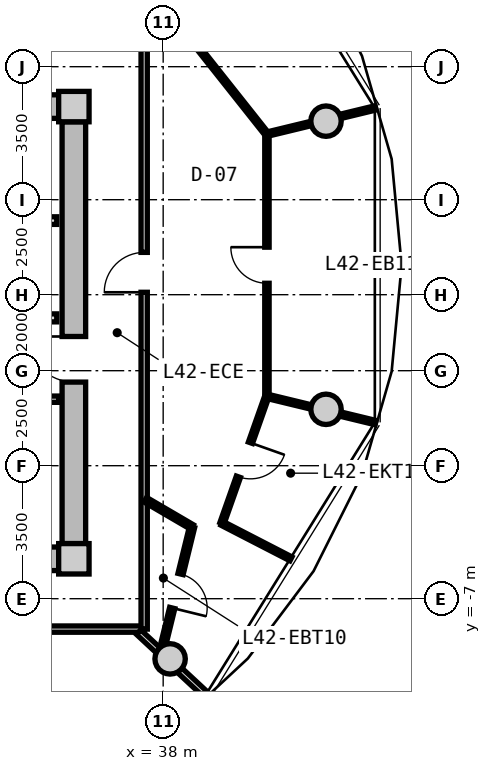
"""IFC4 building model, lengths in metres.
Left out: names, types, materials, properties, quantities, classifications, styles, units other than length and angle.
Written with IfcOpenShell. Run it as: python <this file> out.ifc"""

import sys

from ifc_helpers import new_model, si_unit, direction, frame, frame_2d, origin, origin_2d, place, context, subcontext, project, spatial, rectangle, circle, extrude, source, transform, mapped, element, fill, save


model = new_model("IFC4")
c1 = context("Model", 3, precision=1e-05, world=origin(), true_north=direction((0.0, 1.0)))
c2 = subcontext(c1, "Body", "Model", "MODEL_VIEW")
j1 = project(units=[si_unit("LENGTHUNIT", "METRE"), si_unit("PLANEANGLEUNIT", "RADIAN")], contexts=[c1])
p1 = place(None, origin())
s1 = spatial("IfcSite", under=j1, at=p1, CompositionType="ELEMENT")
p2 = place(p1, origin())
s2 = spatial("IfcBuilding", under=s1, at=p2, CompositionType="ELEMENT")
p3 = place(p2, frame((0.0, 0.0, 137.35)))
s3 = spatial("IfcBuildingStorey", under=s2, at=p3, CompositionType="ELEMENT", Elevation=137.35)
m1 = source(origin(), c2, "Body", "SweptSolid", [
    extrude(rectangle(XDim=0.8, YDim=0.8, at=origin_2d()), origin(), (0.0, 0.0, 1.0), 3.05),
])
for number, where, z_axis, x_axis in (
    (1, (35.65, -5.95, 0.0), (0.0, 0.0, 1.0), (1.0, 0.0, 0.0)),
    (2, (35.65, 5.95, 0.0), (0.0, 0.0, 1.0), (1.0, 0.0, 0.0)),
):
    element("IfcColumn", number, at=place(p3, frame(where, z_axis=z_axis, x_axis=x_axis)), inside=s3, PredefinedType="COLUMN", context=c2, shape_type="MappedRepresentation", body=[
        mapped(m1, transform((0.0, 0.0, 0.0), x_axis=(1.0, 0.0, 0.0), y_axis=(0.0, 1.0, 0.0), z_axis=(0.0, 0.0, 1.0), scale=1.0)),
    ])
m2 = source(origin(), c2, "Body", "SweptSolid", [
    extrude(rectangle(XDim=14.5, YDim=0.62, at=frame_2d((7.25, 0.0))), origin(), (0.0, 0.0, 1.0), 2.81),
])
for number, where, z_axis, x_axis in (
    (3, (20.75, 5.95, 0.0), (0.0, 0.0, 1.0), (1.0, 0.0, 0.0)),
    (4, (35.25, -5.95, 0.0), (0.0, 0.0, 1.0), (-1.0, 0.0, 0.0)),
):
    element("IfcWall", number, at=place(p3, frame(where, z_axis=z_axis, x_axis=x_axis)), inside=s3, PredefinedType="SHEAR", context=c2, shape_type="MappedRepresentation", body=[
        mapped(m2, transform((0.0, 0.0, 0.0), x_axis=(1.0, 0.0, 0.0), y_axis=(0.0, 1.0, 0.0), z_axis=(0.0, 0.0, 1.0), scale=1.0)),
    ])
m3 = source(origin(), c2, "Body", "SweptSolid", [
    extrude(rectangle(XDim=11.1, YDim=0.62, at=frame_2d((5.55, 0.0))), origin(), (0.0, 0.0, 1.0), 2.81),
])
p4 = place(p3, frame((35.65, 5.55, 0.0), z_axis=(0.0, 0.0, 1.0), x_axis=(0.0, -1.0, 0.0)))
e5 = element("IfcWall", 5, at=p4, inside=s3, PredefinedType="SHEAR", context=c2, shape_type="MappedRepresentation", body=[
    mapped(m3, transform((0.0, 0.0, 0.0), x_axis=(1.0, 0.0, 0.0), y_axis=(0.0, 1.0, 0.0), z_axis=(0.0, 0.0, 1.0), scale=1.0)),
])
p5 = place(p4, frame((5.65, 0.0, 0.0)))
e6 = element("IfcOpeningElement", 6, at=p5, cuts=e5, PredefinedType="OPENING", context=c2, shape_type="SweptSolid", body=[
    extrude(rectangle(XDim=1.2, YDim=2.15, at=frame_2d((0.6, 1.075))), frame((0.0, 0.32, 0.0), z_axis=(0.0, -1.0, 0.0), x_axis=(1.0, 0.0, 0.0)), (0.0, 0.0, 1.0), 0.64),
])
m4 = source(origin(), c2, "Body", "SweptSolid", [
    extrude(circle(Radius=0.4, at=origin_2d()), origin(), (0.0, 0.0, 1.0), 3.05),
])
for number, where, z_axis, x_axis in (
    (7, (42.285, 5.567, 0.0), (0.0, 0.0, 1.0), (1.0, 0.0, 0.0)),
    (8, (38.183, -8.584, 0.0), (0.0, 0.0, 1.0), (1.0, 0.0, 0.0)),
    (9, (42.285, -2.016, 0.0), (0.0, 0.0, 1.0), (1.0, 0.0, 0.0)),
):
    element("IfcColumn", number, at=place(p3, frame(where, z_axis=z_axis, x_axis=x_axis)), inside=s3, PredefinedType="COLUMN", context=c2, shape_type="MappedRepresentation", body=[
        mapped(m4, transform((0.0, 0.0, 0.0), x_axis=(1.0, 0.0, 0.0), y_axis=(0.0, 1.0, 0.0), z_axis=(0.0, 0.0, 1.0), scale=1.0)),
    ])
m5 = source(origin(), c2, "Body", "SweptSolid", [
    extrude(rectangle(XDim=3.2, YDim=0.2, at=frame_2d((1.6, 0.0))), origin(), (0.0, 0.0, 1.0), 2.795),
])
p6 = place(p3, frame((32.0, 2.95, 0.0), z_axis=(0.0, 0.0, 1.0), x_axis=(1.0, 0.0, 0.0)))
e10 = element("IfcWall", 10, at=p6, inside=s3, PredefinedType="PARTITIONING", context=c2, shape_type="MappedRepresentation", body=[
    mapped(m5, transform((0.0, 0.0, 0.0), x_axis=(1.0, 0.0, 0.0), y_axis=(0.0, 1.0, 0.0), z_axis=(0.0, 0.0, 1.0), scale=1.0)),
])
m6 = source(origin(), c2, "Body", "SweptSolid", [
    extrude(rectangle(XDim=6.66, YDim=0.21, at=frame_2d((3.33, 0.0))), origin(), (0.0, 0.0, 1.0), 2.795),
])
p7 = place(p3, frame((28.54, 0.39, 0.0), z_axis=(0.0, 0.0, 1.0), x_axis=(1.0, 0.0, 0.0)))
e11 = element("IfcWall", 11, at=p7, inside=s3, PredefinedType="PARTITIONING", context=c2, shape_type="MappedRepresentation", body=[
    mapped(m6, transform((0.0, 0.0, 0.0), x_axis=(1.0, 0.0, 0.0), y_axis=(0.0, 1.0, 0.0), z_axis=(0.0, 0.0, 1.0), scale=1.0)),
])
p8 = place(p7, frame((1.0, 0.0, 0.0)))
e12 = element("IfcOpeningElement", 12, at=p8, cuts=e11, PredefinedType="OPENING", context=c2, shape_type="SweptSolid", body=[
    extrude(rectangle(XDim=1.2, YDim=2.15, at=frame_2d((0.6, 1.075))), frame((0.0, 0.115, 0.0), z_axis=(0.0, -1.0, 0.0), x_axis=(1.0, 0.0, 0.0)), (0.0, 0.0, 1.0), 0.23),
])
m7 = source(origin(), c2, "Body", "SweptSolid", [
    extrude(rectangle(XDim=2.7, YDim=0.165, at=frame_2d((1.35, 0.0))), origin(), (0.0, 0.0, 1.0), 2.795),
])
p9 = place(p3, frame((32.55, -1.75, 0.0), z_axis=(0.0, 0.0, 1.0), x_axis=(1.0, 0.0, 0.0)))
e13 = element("IfcWall", 13, at=p9, inside=s3, PredefinedType="PARTITIONING", context=c2, shape_type="MappedRepresentation", body=[
    mapped(m7, transform((0.0, 0.0, 0.0), x_axis=(1.0, 0.0, 0.0), y_axis=(0.0, 1.0, 0.0), z_axis=(0.0, 0.0, 1.0), scale=1.0)),
])
p10 = place(p9, frame((0.85, 0.0, 0.0)))
e14 = element("IfcOpeningElement", 14, at=p10, cuts=e13, PredefinedType="OPENING", context=c2, shape_type="SweptSolid", body=[
    extrude(rectangle(XDim=0.925, YDim=2.1, at=frame_2d((0.462, 1.05))), frame((0.0, 0.093, 0.0), z_axis=(0.0, -1.0, 0.0), x_axis=(1.0, 0.0, 0.0)), (0.0, 0.0, 1.0), 0.185),
])
m8 = source(origin(), c2, "Body", "SweptSolid", [
    extrude(rectangle(XDim=8.6, YDim=0.165, at=frame_2d((4.3, 0.0))), origin(), (0.0, 0.0, 1.0), 2.795),
])
p11 = place(p3, frame((37.5, -7.8, 0.0), z_axis=(0.0, 0.0, 1.0), x_axis=(-1.0, 0.0, 0.0)))
e15 = element("IfcWall", 15, at=p11, inside=s3, PredefinedType="PARTITIONING", context=c2, shape_type="MappedRepresentation", body=[
    mapped(m8, transform((0.0, 0.0, 0.0), x_axis=(1.0, 0.0, 0.0), y_axis=(0.0, 1.0, 0.0), z_axis=(0.0, 0.0, 1.0), scale=1.0)),
])
p12 = place(p11, frame((3.775, 0.0, 0.0)))
e16 = element("IfcOpeningElement", 16, at=p12, cuts=e15, PredefinedType="OPENING", context=c2, shape_type="SweptSolid", body=[
    extrude(rectangle(XDim=1.05, YDim=2.15, at=frame_2d((0.525, 1.075))), frame((0.0, 0.093, 0.0), z_axis=(0.0, -1.0, 0.0), x_axis=(1.0, 0.0, 0.0)), (0.0, 0.0, 1.0), 0.185),
])
m9 = source(origin(), c2, "Body", "SweptSolid", [
    extrude(rectangle(XDim=15.6, YDim=0.165, at=frame_2d((7.8, 0.0))), origin(), (0.0, 0.0, 1.0), 2.795),
])
p13 = place(p3, frame((37.5, 7.8, 0.0), z_axis=(0.0, 0.0, 1.0), x_axis=(0.0, -1.0, 0.0)))
e17 = element("IfcWall", 17, at=p13, inside=s3, PredefinedType="PARTITIONING", context=c2, shape_type="MappedRepresentation", body=[
    mapped(m9, transform((0.0, 0.0, 0.0), x_axis=(1.0, 0.0, 0.0), y_axis=(0.0, 1.0, 0.0), z_axis=(0.0, 0.0, 1.0), scale=1.0)),
])
p14 = place(p13, frame((5.687, 0.0, 0.0)))
e18 = element("IfcOpeningElement", 18, at=p14, cuts=e17, PredefinedType="OPENING", context=c2, shape_type="SweptSolid", body=[
    extrude(rectangle(XDim=1.05, YDim=2.15, at=frame_2d((0.525, 1.075))), frame((0.0, 0.093, 0.0), z_axis=(0.0, -1.0, 0.0), x_axis=(1.0, 0.0, 0.0)), (0.0, 0.0, 1.0), 0.185),
])
m10 = source(origin(), c2, "Body", "SweptSolid", [
    extrude(rectangle(XDim=2.435, YDim=0.165, at=frame_2d((1.217, 0.0))), origin(), (0.0, 0.0, 1.0), 2.345),
])
p15 = place(p3, frame((37.354, -7.88, 0.0), z_axis=(0.0, 0.0, 1.0), x_axis=(0.732164643118, -0.681127693878, 0.0)))
e19 = element("IfcWall", 19, at=p15, inside=s3, PredefinedType="PARTITIONING", context=c2, shape_type="MappedRepresentation", body=[
    mapped(m10, transform((0.0, 0.0, 0.0), x_axis=(1.0, 0.0, 0.0), y_axis=(0.0, 1.0, 0.0), z_axis=(0.0, 0.0, 1.0), scale=1.0)),
])
m11 = source(origin(), c2, "Body", "SweptSolid", [
    extrude(rectangle(XDim=6.897, YDim=0.115, at=frame_2d((3.448, 0.0))), origin(), (0.0, 0.0, 1.0), 2.795),
])
p16 = place(p3, frame((40.73, -1.673, 0.0), z_axis=(0.0, 0.0, 1.0), x_axis=(0.0, 1.0, 0.0)))
e20 = element("IfcWall", 20, at=p16, inside=s3, PredefinedType="PARTITIONING", context=c2, shape_type="MappedRepresentation", body=[
    mapped(m11, transform((0.0, 0.0, 0.0), x_axis=(1.0, 0.0, 0.0), y_axis=(0.0, 1.0, 0.0), z_axis=(0.0, 0.0, 1.0), scale=1.0)),
])
p17 = place(p16, frame((2.973, 0.0, 0.0)))
e21 = element("IfcOpeningElement", 21, at=p17, cuts=e20, PredefinedType="OPENING", context=c2, shape_type="SweptSolid", body=[
    extrude(rectangle(XDim=0.95, YDim=2.1, at=frame_2d((0.475, 1.05))), frame((0.0, 0.067, 0.0), z_axis=(0.0, -1.0, 0.0), x_axis=(1.0, 0.0, 0.0)), (0.0, 0.0, 1.0), 0.135),
])
m12 = source(origin(), c2, "Body", "SweptSolid", [
    extrude(rectangle(XDim=2.941, YDim=0.115, at=frame_2d((1.471, 0.0))), origin(), (0.0, 0.0, 1.0), 2.345),
])
p18 = place(p3, frame((40.73, -1.673, 0.0), z_axis=(0.0, 0.0, 1.0), x_axis=(0.971874866371, -0.235497864357, 0.0)))
e22 = element("IfcWall", 22, at=p18, inside=s3, PredefinedType="PARTITIONING", context=c2, shape_type="MappedRepresentation", body=[
    mapped(m12, transform((0.0, 0.0, 0.0), x_axis=(1.0, 0.0, 0.0), y_axis=(0.0, 1.0, 0.0), z_axis=(0.0, 0.0, 1.0), scale=1.0)),
])
m13 = source(origin(), c2, "Body", "SweptSolid", [
    extrude(rectangle(XDim=6.902, YDim=0.115, at=frame_2d((3.451, 0.0))), origin(), (0.0, 0.0, 1.0), 2.795),
])
p19 = place(p3, frame((40.729, 5.223, 0.0), z_axis=(0.0, 0.0, 1.0), x_axis=(-0.62123371778, 0.783625336429, 0.0)))
e23 = element("IfcWall", 23, at=p19, inside=s3, PredefinedType="PARTITIONING", context=c2, shape_type="MappedRepresentation", body=[
    mapped(m13, transform((0.0, 0.0, 0.0), x_axis=(1.0, 0.0, 0.0), y_axis=(0.0, 1.0, 0.0), z_axis=(0.0, 0.0, 1.0), scale=1.0)),
])
p20 = place(p19, frame((2.976, 0.0, 0.0)))
e24 = element("IfcOpeningElement", 24, at=p20, cuts=e23, PredefinedType="OPENING", context=c2, shape_type="SweptSolid", body=[
    extrude(rectangle(XDim=0.95, YDim=2.1, at=frame_2d((0.475, 1.05))), frame((0.0, 0.067, 0.0), z_axis=(0.0, -1.0, 0.0), x_axis=(1.0, 0.0, 0.0)), (0.0, 0.0, 1.0), 0.135),
])
m14 = source(origin(), c2, "Body", "SweptSolid", [
    extrude(rectangle(XDim=2.943, YDim=0.115, at=frame_2d((1.471, 0.0))), origin(), (0.0, 0.0, 1.0), 2.345),
])
p21 = place(p3, frame((40.729, 5.223, 0.0), z_axis=(0.0, 0.0, 1.0), x_axis=(0.971864495214, 0.235540660911, 0.0)))
e25 = element("IfcWall", 25, at=p21, inside=s3, PredefinedType="PARTITIONING", context=c2, shape_type="MappedRepresentation", body=[
    mapped(m14, transform((0.0, 0.0, 0.0), x_axis=(1.0, 0.0, 0.0), y_axis=(0.0, 1.0, 0.0), z_axis=(0.0, 0.0, 1.0), scale=1.0)),
])
m15 = source(origin(), c2, "Body", "SweptSolid", [
    extrude(rectangle(XDim=1.425, YDim=0.14, at=frame_2d((0.712, 0.0))), origin(), (0.0, 0.0, 1.0), 2.795),
])
p22 = place(p3, frame((37.53, -4.396, 0.0), z_axis=(0.0, 0.0, 1.0), x_axis=(0.86324395577, -0.50478695786, 0.0)))
e26 = element("IfcWall", 26, at=p22, inside=s3, PredefinedType="PARTITIONING", context=c2, shape_type="MappedRepresentation", body=[
    mapped(m15, transform((0.0, 0.0, 0.0), x_axis=(1.0, 0.0, 0.0), y_axis=(0.0, 1.0, 0.0), z_axis=(0.0, 0.0, 1.0), scale=1.0)),
])
m16 = source(origin(), c2, "Body", "SweptSolid", [
    extrude(rectangle(XDim=3.464, YDim=0.14, at=frame_2d((1.732, 0.0))), origin(), (0.0, 0.0, 1.0), 2.795),
])
p23 = place(p3, frame((38.76, -5.115, 0.0), z_axis=(0.0, 0.0, 1.0), x_axis=(-0.238055968485, -0.971251438027, 0.0)))
e27 = element("IfcWall", 27, at=p23, inside=s3, PredefinedType="PARTITIONING", context=c2, shape_type="MappedRepresentation", body=[
    mapped(m16, transform((0.0, 0.0, 0.0), x_axis=(1.0, 0.0, 0.0), y_axis=(0.0, 1.0, 0.0), z_axis=(0.0, 0.0, 1.0), scale=1.0)),
])
p24 = place(p23, frame((1.272, 0.0, 0.0)))
e28 = element("IfcOpeningElement", 28, at=p24, cuts=e27, PredefinedType="OPENING", context=c2, shape_type="SweptSolid", body=[
    extrude(rectangle(XDim=0.92, YDim=2.1, at=frame_2d((0.46, 1.05))), frame((0.0, 0.08, 0.0), z_axis=(0.0, -1.0, 0.0), x_axis=(1.0, 0.0, 0.0)), (0.0, 0.0, 1.0), 0.16),
])
m17 = source(origin(), c2, "Body", "SweptSolid", [
    extrude(rectangle(XDim=2.043, YDim=0.115, at=frame_2d((1.022, 0.0))), origin(), (0.0, 0.0, 1.0), 2.795),
])
p25 = place(p3, frame((39.547, -5.016, 0.0), z_axis=(0.0, 0.0, 1.0), x_axis=(0.888790240023, -0.45831420362, 0.0)))
e29 = element("IfcWall", 29, at=p25, inside=s3, PredefinedType="PARTITIONING", context=c2, shape_type="MappedRepresentation", body=[
    mapped(m17, transform((0.0, 0.0, 0.0), x_axis=(1.0, 0.0, 0.0), y_axis=(0.0, 1.0, 0.0), z_axis=(0.0, 0.0, 1.0), scale=1.0)),
])
m18 = source(origin(), c2, "Body", "SweptSolid", [
    extrude(rectangle(XDim=3.546, YDim=0.115, at=frame_2d((1.773, 0.0))), origin(), (0.0, 0.0, 1.0), 2.795),
])
p26 = place(p3, frame((39.547, -5.016, 0.0), z_axis=(0.0, 0.0, 1.0), x_axis=(0.333403534043, 0.942784218943, 0.0)))
e30 = element("IfcWall", 30, at=p26, inside=s3, PredefinedType="PARTITIONING", context=c2, shape_type="MappedRepresentation", body=[
    mapped(m18, transform((0.0, 0.0, 0.0), x_axis=(1.0, 0.0, 0.0), y_axis=(0.0, 1.0, 0.0), z_axis=(0.0, 0.0, 1.0), scale=1.0)),
])
p27 = place(p26, frame((1.298, 0.0, 0.0)))
e31 = element("IfcOpeningElement", 31, at=p27, cuts=e30, PredefinedType="OPENING", context=c2, shape_type="SweptSolid", body=[
    extrude(rectangle(XDim=0.95, YDim=2.1, at=frame_2d((0.475, 1.05))), frame((0.0, 0.067, 0.0), z_axis=(0.0, -1.0, 0.0), x_axis=(1.0, 0.0, 0.0)), (0.0, 0.0, 1.0), 0.135),
])
m19 = source(origin(), c2, "Body", "SweptSolid", [
    extrude(rectangle(XDim=1.2, YDim=2.15, at=frame_2d((0.6, 1.075))), frame((0.0, 0.025, 0.0), z_axis=(0.0, -1.0, 0.0), x_axis=(1.0, 0.0, 0.0)), (0.0, 0.0, 1.0), 0.05),
])
p28 = place(p5, frame((1.2, 0.0, 0.0), z_axis=(0.0, 0.0, 1.0), x_axis=(-1.0, 0.0, 0.0)))
e32 = element("IfcDoor", 32, at=p28, inside=s3, OperationType="SINGLE_SWING_RIGHT", PredefinedType="DOOR", context=c2, shape_type="MappedRepresentation", body=[
    mapped(m19, transform((0.0, 0.0, 0.0), x_axis=(1.0, 0.0, 0.0), y_axis=(0.0, 1.0, 0.0), z_axis=(0.0, 0.0, 1.0), scale=1.0)),
])
fill(e6, e32)
m20 = source(origin(), c2, "Body", "SweptSolid", [
    extrude(rectangle(XDim=1.05, YDim=2.15, at=frame_2d((0.525, 1.075))), frame((0.0, 0.025, 0.0), z_axis=(0.0, -1.0, 0.0), x_axis=(1.0, 0.0, 0.0)), (0.0, 0.0, 1.0), 0.05),
])
p29 = place(p14, frame((1.05, 0.0, 0.0), z_axis=(0.0, 0.0, 1.0), x_axis=(-1.0, 0.0, 0.0)))
e33 = element("IfcDoor", 33, at=p29, inside=s3, OperationType="SINGLE_SWING_LEFT", PredefinedType="DOOR", context=c2, shape_type="MappedRepresentation", body=[
    mapped(m20, transform((0.0, 0.0, 0.0), x_axis=(1.0, 0.0, 0.0), y_axis=(0.0, 1.0, 0.0), z_axis=(0.0, 0.0, 1.0), scale=1.0)),
])
fill(e18, e33)
m21 = source(origin(), c2, "Body", "SweptSolid", [
    extrude(rectangle(XDim=0.92, YDim=2.1, at=frame_2d((0.46, 1.05))), frame((0.0, 0.025, 0.0), z_axis=(0.0, -1.0, 0.0), x_axis=(1.0, 0.0, 0.0)), (0.0, 0.0, 1.0), 0.05),
])
p30 = place(p24, origin())
e34 = element("IfcDoor", 34, at=p30, inside=s3, OperationType="SINGLE_SWING_RIGHT", PredefinedType="DOOR", context=c2, shape_type="MappedRepresentation", body=[
    mapped(m21, transform((0.0, 0.0, 0.0), x_axis=(1.0, 0.0, 0.0), y_axis=(0.0, 1.0, 0.0), z_axis=(0.0, 0.0, 1.0), scale=1.0)),
])
fill(e28, e34)
m22 = source(origin(), c2, "Body", "SweptSolid", [
    extrude(rectangle(XDim=0.95, YDim=2.1, at=frame_2d((0.475, 1.05))), frame((0.0, 0.025, 0.0), z_axis=(0.0, -1.0, 0.0), x_axis=(1.0, 0.0, 0.0)), (0.0, 0.0, 1.0), 0.05),
])
p31 = place(p27, frame((0.95, 0.0, 0.0), z_axis=(0.0, 0.0, 1.0), x_axis=(-1.0, 0.0, 0.0)))
e35 = element("IfcDoor", 35, at=p31, inside=s3, OperationType="SINGLE_SWING_LEFT", PredefinedType="DOOR", context=c2, shape_type="MappedRepresentation", body=[
    mapped(m22, transform((0.0, 0.0, 0.0), x_axis=(1.0, 0.0, 0.0), y_axis=(0.0, 1.0, 0.0), z_axis=(0.0, 0.0, 1.0), scale=1.0)),
])
fill(e31, e35)
p32 = place(p17, origin())
e36 = element("IfcDoor", 36, at=p32, inside=s3, OperationType="SINGLE_SWING_RIGHT", PredefinedType="DOOR", context=c2, shape_type="MappedRepresentation", body=[
    mapped(m22, transform((0.0, 0.0, 0.0), x_axis=(1.0, 0.0, 0.0), y_axis=(0.0, 1.0, 0.0), z_axis=(0.0, 0.0, 1.0), scale=1.0)),
])
fill(e21, e36)
save(model, sys.argv[1])
